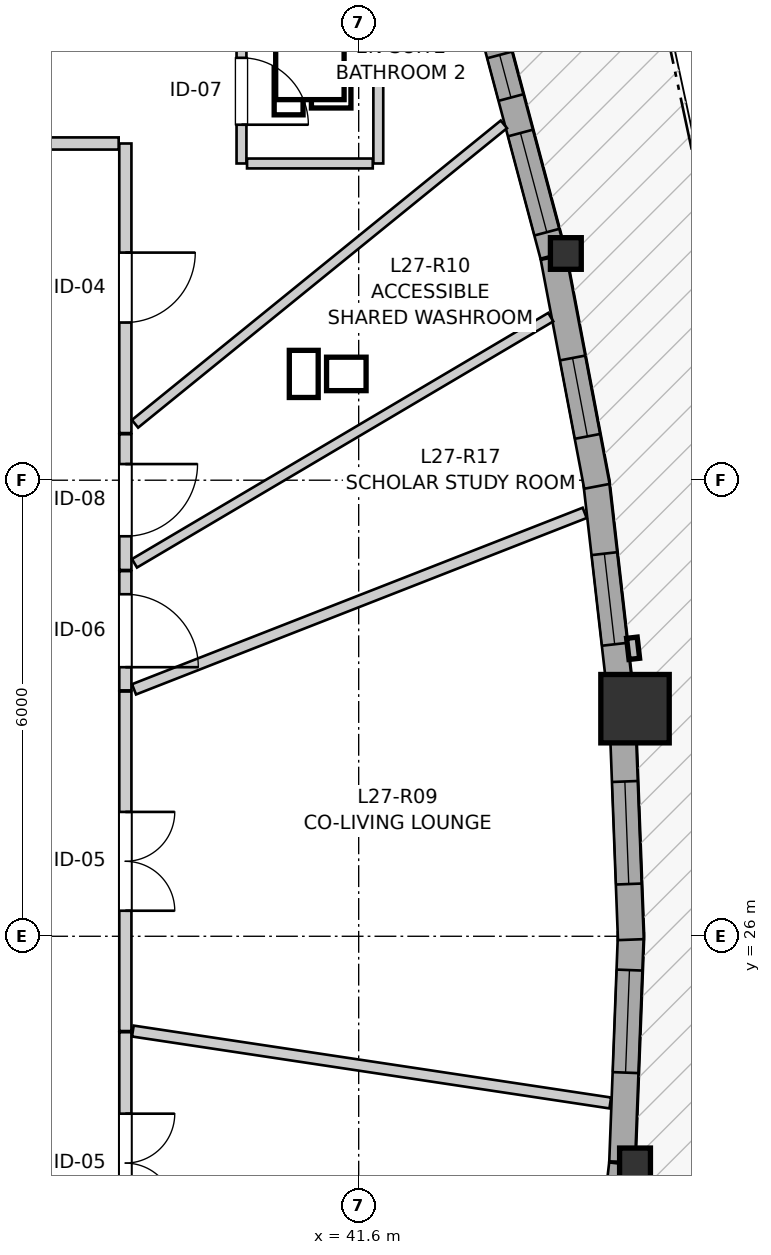
"""IFC4 building model, lengths in metres.
Left out: names, types, materials, properties, quantities, classifications, styles, units other than length and angle.
Written with IfcOpenShell. Run it as: python <this file> out.ifc"""

import sys

from ifc_helpers import new_model, si_unit, direction, frame, frame_2d, origin, origin_2d, place, context, subcontext, project, spatial, rectangle, i_section, extrude, source, transform, mapped, element, fill, save


model = new_model("IFC4")
c1 = context("Model", 3, precision=1e-05, world=origin(), true_north=direction((0.0, 1.0)))
c2 = subcontext(c1, "Body", "Model", "MODEL_VIEW")
j1 = project(units=[si_unit("LENGTHUNIT", "METRE"), si_unit("PLANEANGLEUNIT", "RADIAN")], contexts=[c1])
p1 = place(None, origin())
s1 = spatial("IfcSite", under=j1, at=p1, CompositionType="ELEMENT")
p2 = place(p1, origin())
s2 = spatial("IfcBuilding", under=s1, at=p2, CompositionType="ELEMENT")
p3 = place(p2, frame((0.0, 0.0, 92.8)))
s3 = spatial("IfcBuildingStorey", under=s2, at=p3, CompositionType="ELEMENT", Elevation=92.8)
m1 = source(origin(), c2, "Body", "SweptSolid", [
    extrude(i_section(OverallWidth=0.406, OverallDepth=0.416, WebThickness=0.027, FlangeThickness=0.044, FilletRadius=0.015, at=origin_2d()), origin(), (0.0, 0.0, 1.0), 2.95),
])
p4 = place(p3, frame((45.236, 23.006, 0.0), z_axis=(0.0, 0.0, 1.0), x_axis=(1.0, 0.0, 0.0)))
e1 = element("IfcColumn", 1, at=p4, inside=s3, PredefinedType="PILASTER", context=c2, shape_type="MappedRepresentation", body=[
    mapped(m1, transform((0.0, 0.0, 0.0), x_axis=(1.0, 0.0, 0.0), y_axis=(0.0, 1.0, 0.0), z_axis=(0.0, 0.0, 1.0), scale=1.0)),
])
m2 = source(origin(), c2, "Body", "SweptSolid", [
    extrude(rectangle(XDim=0.9, YDim=0.9, at=origin_2d()), origin(), (0.0, 0.0, 1.0), 2.95),
])
p5 = place(p3, frame((45.236, 28.994, 0.0), z_axis=(0.0, 0.0, 1.0), x_axis=(1.0, 0.0, 0.0)))
e2 = element("IfcColumn", 2, at=p5, inside=s3, PredefinedType="COLUMN", context=c2, shape_type="MappedRepresentation", body=[
    mapped(m2, transform((0.0, 0.0, 0.0), x_axis=(1.0, 0.0, 0.0), y_axis=(0.0, 1.0, 0.0), z_axis=(0.0, 0.0, 1.0), scale=1.0)),
])
p6 = place(p3, frame((44.325, 34.983, 0.0), z_axis=(0.0, 0.0, 1.0), x_axis=(1.0, 0.0, 0.0)))
e3 = element("IfcColumn", 3, at=p6, inside=s3, PredefinedType="PILASTER", context=c2, shape_type="MappedRepresentation", body=[
    mapped(m1, transform((0.0, 0.0, 0.0), x_axis=(1.0, 0.0, 0.0), y_axis=(0.0, 1.0, 0.0), z_axis=(0.0, 0.0, 1.0), scale=1.0)),
])
p7 = place(p3, frame((44.721, 19.993, 0.0), z_axis=(0.0, 0.0, 1.0), x_axis=(0.113224078967, 0.993569478165, 0.0)))
e4 = element("IfcWall", 4, at=p7, inside=s3, PredefinedType="SOLIDWALL", context=c2, shape_type="SweptSolid", body=[
    extrude(rectangle(XDim=3.032, YDim=0.34, at=frame_2d((1.516, 0.0))), origin(), (0.0, 0.0, 1.0), 2.48),
])
p8 = place(p7, frame((0.701, 0.0, 0.82)))
e5 = element("IfcOpeningElement", 5, at=p8, cuts=e4, PredefinedType="OPENING", context=c2, shape_type="SweptSolid", body=[
    extrude(rectangle(XDim=1.65, YDim=1.45, at=frame_2d((0.825, 0.725))), frame((0.0, 0.18, 0.0), z_axis=(0.0, -1.0, 0.0), x_axis=(1.0, 0.0, 0.0)), (0.0, 0.0, 1.0), 0.36),
])
p9 = place(p3, frame((45.067, 23.032, 0.0), z_axis=(0.0, 0.0, 1.0), x_axis=(0.037985210196, 0.999278301479, 0.0)))
e6 = element("IfcWall", 6, at=p9, inside=s3, PredefinedType="SOLIDWALL", context=c2, shape_type="SweptSolid", body=[
    extrude(rectangle(XDim=3.014, YDim=0.34, at=frame_2d((1.507, 0.0))), origin(), (0.0, 0.0, 1.0), 2.48),
])
p10 = place(p9, frame((1.175, 0.0, 0.82)))
e7 = element("IfcOpeningElement", 7, at=p10, cuts=e6, PredefinedType="OPENING", context=c2, shape_type="SweptSolid", body=[
    extrude(rectangle(XDim=1.35, YDim=1.45, at=frame_2d((0.675, 0.725))), frame((0.0, 0.18, 0.0), z_axis=(0.0, -1.0, 0.0), x_axis=(1.0, 0.0, 0.0)), (0.0, 0.0, 1.0), 0.36),
])
p11 = place(p3, frame((45.181, 25.956, 0.0), z_axis=(0.0, 0.0, 1.0), x_axis=(-0.037958336355, 0.999279322663, 0.0)))
e8 = element("IfcWall", 8, at=p11, inside=s3, PredefinedType="SOLIDWALL", context=c2, shape_type="SweptSolid", body=[
    extrude(rectangle(XDim=2.804, YDim=0.34, at=frame_2d((1.402, 0.0))), origin(), (0.0, 0.0, 1.0), 2.48),
])
p12 = place(p11, frame((0.732, 0.0, 0.82)))
e9 = element("IfcOpeningElement", 9, at=p12, cuts=e8, PredefinedType="OPENING", context=c2, shape_type="SweptSolid", body=[
    extrude(rectangle(XDim=1.35, YDim=1.45, at=frame_2d((0.675, 0.725))), frame((0.0, 0.18, 0.0), z_axis=(0.0, -1.0, 0.0), x_axis=(1.0, 0.0, 0.0)), (0.0, 0.0, 1.0), 0.36),
])
p13 = place(p3, frame((45.041, 29.204, 0.0), z_axis=(0.0, 0.0, 1.0), x_axis=(-0.113261075266, 0.993565261485, 0.0)))
e10 = element("IfcWall", 10, at=p13, inside=s3, PredefinedType="SOLIDWALL", context=c2, shape_type="SweptSolid", body=[
    extrude(rectangle(XDim=2.822, YDim=0.34, at=frame_2d((1.411, 0.0))), origin(), (0.0, 0.0, 1.0), 2.48),
])
p14 = place(p13, frame((0.642, 0.0, 0.82)))
e11 = element("IfcOpeningElement", 11, at=p14, cuts=e10, PredefinedType="OPENING", context=c2, shape_type="SweptSolid", body=[
    extrude(rectangle(XDim=1.2, YDim=1.45, at=frame_2d((0.6, 0.725))), frame((0.0, 0.18, 0.0), z_axis=(0.0, -1.0, 0.0), x_axis=(1.0, 0.0, 0.0)), (0.0, 0.0, 1.0), 0.36),
])
p15 = place(p3, frame((44.735, 31.919, 0.0), z_axis=(0.0, 0.0, 1.0), x_axis=(-0.186735196273, 0.982410284185, 0.0)))
e12 = element("IfcWall", 12, at=p15, inside=s3, PredefinedType="SOLIDWALL", context=c2, shape_type="SweptSolid", body=[
    extrude(rectangle(XDim=3.066, YDim=0.34, at=frame_2d((1.533, 0.0))), origin(), (0.0, 0.0, 1.0), 2.48),
])
p16 = place(p15, frame((0.669, 0.0, 0.82)))
e13 = element("IfcOpeningElement", 13, at=p16, cuts=e12, PredefinedType="OPENING", context=c2, shape_type="SweptSolid", body=[
    extrude(rectangle(XDim=1.05, YDim=1.45, at=frame_2d((0.525, 0.725))), frame((0.0, 0.18, 0.0), z_axis=(0.0, -1.0, 0.0), x_axis=(1.0, 0.0, 0.0)), (0.0, 0.0, 1.0), 0.36),
])
p17 = place(p3, frame((44.156, 34.958, 0.0), z_axis=(0.0, 0.0, 1.0), x_axis=(-0.257033600382, 0.966402467026, 0.0)))
e14 = element("IfcWall", 14, at=p17, inside=s3, PredefinedType="SOLIDWALL", context=c2, shape_type="SweptSolid", body=[
    extrude(rectangle(XDim=3.116, YDim=0.34, at=frame_2d((1.558, 0.0))), origin(), (0.0, 0.0, 1.0), 2.48),
])
p18 = place(p17, frame((0.315, 0.0, 0.82)))
e15 = element("IfcOpeningElement", 15, at=p18, cuts=e14, PredefinedType="OPENING", context=c2, shape_type="SweptSolid", body=[
    extrude(rectangle(XDim=1.35, YDim=1.45, at=frame_2d((0.675, 0.725))), frame((0.0, 0.18, 0.0), z_axis=(0.0, -1.0, 0.0), x_axis=(1.0, 0.0, 0.0)), (0.0, 0.0, 1.0), 0.36),
])
p19 = place(p17, frame((2.148, 0.0, 0.82)))
e16 = element("IfcOpeningElement", 16, at=p19, cuts=e14, PredefinedType="OPENING", context=c2, shape_type="SweptSolid", body=[
    extrude(rectangle(XDim=0.58, YDim=1.35, at=frame_2d((0.29, 0.675))), frame((0.0, 0.18, 0.0), z_axis=(0.0, -1.0, 0.0), x_axis=(1.0, 0.0, 0.0)), (0.0, 0.0, 1.0), 0.36),
])
p20 = place(p3, frame((38.53, 29.22, 0.0), z_axis=(0.0, 0.0, 1.0), x_axis=(0.0, -1.0, 0.0)))
e17 = element("IfcWall", 17, at=p20, inside=s3, PredefinedType="PARTITIONING", context=c2, shape_type="SweptSolid", body=[
    extrude(rectangle(XDim=4.467, YDim=0.16, at=frame_2d((2.233, 0.0))), origin(), (0.0, 0.0, 1.0), 2.95),
])
p21 = place(p20, frame((1.584, 0.0, 0.0)))
e18 = element("IfcOpeningElement", 18, at=p21, cuts=e17, PredefinedType="OPENING", context=c2, shape_type="SweptSolid", body=[
    extrude(rectangle(XDim=1.3, YDim=2.1, at=frame_2d((0.65, 1.05))), frame((0.0, 0.09, 0.0), z_axis=(0.0, -1.0, 0.0), x_axis=(1.0, 0.0, 0.0)), (0.0, 0.0, 1.0), 0.18),
])
p22 = place(p3, frame((38.53, 36.43, 0.0), z_axis=(0.0, 0.0, 1.0), x_axis=(0.0, -1.0, 0.0)))
e19 = element("IfcWall", 19, at=p22, inside=s3, PredefinedType="PARTITIONING", context=c2, shape_type="SweptSolid", body=[
    extrude(rectangle(XDim=3.81, YDim=0.16, at=frame_2d((1.905, 0.0))), origin(), (0.0, 0.0, 1.0), 2.588),
])
p23 = place(p22, frame((1.436, 0.0, 0.0)))
e20 = element("IfcOpeningElement", 20, at=p23, cuts=e19, PredefinedType="OPENING", context=c2, shape_type="SweptSolid", body=[
    extrude(rectangle(XDim=0.92, YDim=2.1, at=frame_2d((0.46, 1.05))), frame((0.0, 0.09, 0.0), z_axis=(0.0, -1.0, 0.0), x_axis=(1.0, 0.0, 0.0)), (0.0, 0.0, 1.0), 0.18),
])
p24 = place(p3, frame((38.53, 24.738, 0.0), z_axis=(0.0, 0.0, 1.0), x_axis=(0.0, -1.0, 0.0)))
e21 = element("IfcWall", 21, at=p24, inside=s3, PredefinedType="PARTITIONING", context=c2, shape_type="SweptSolid", body=[
    extrude(rectangle(XDim=3.442, YDim=0.16, at=frame_2d((1.721, 0.0))), origin(), (0.0, 0.0, 1.0), 2.95),
])
p25 = place(p24, frame((1.072, 0.0, 0.0)))
e22 = element("IfcOpeningElement", 22, at=p25, cuts=e21, PredefinedType="OPENING", context=c2, shape_type="SweptSolid", body=[
    extrude(rectangle(XDim=1.3, YDim=2.1, at=frame_2d((0.65, 1.05))), frame((0.0, 0.09, 0.0), z_axis=(0.0, -1.0, 0.0), x_axis=(1.0, 0.0, 0.0)), (0.0, 0.0, 1.0), 0.18),
])
p26 = place(p3, frame((40.058, 38.067, 0.0), z_axis=(0.0, 0.0, 1.0), x_axis=(0.0, -1.0, 0.0)))
e23 = element("IfcWall", 23, at=p26, inside=s3, PredefinedType="PARTITIONING", context=c2, shape_type="SweptSolid", body=[
    extrude(rectangle(XDim=1.9, YDim=0.13, at=frame_2d((0.95, 0.0))), origin(), (0.0, 0.0, 1.0), 2.95),
])
p27 = place(p26, frame((0.51, 0.0, 0.0)))
e24 = element("IfcOpeningElement", 24, at=p27, cuts=e23, PredefinedType="OPENING", context=c2, shape_type="SweptSolid", body=[
    extrude(rectangle(XDim=0.88, YDim=2.05, at=frame_2d((0.44, 1.025))), frame((0.0, 0.075, 0.0), z_axis=(0.0, -1.0, 0.0), x_axis=(1.0, 0.0, 0.0)), (0.0, 0.0, 1.0), 0.15),
])
p28 = place(p3, frame((38.53, 32.605, 0.0), z_axis=(0.0, 0.0, 1.0), x_axis=(0.0, -1.0, 0.0)))
e25 = element("IfcWall", 25, at=p28, inside=s3, PredefinedType="PARTITIONING", context=c2, shape_type="SweptSolid", body=[
    extrude(rectangle(XDim=1.786, YDim=0.16, at=frame_2d((0.893, 0.0))), origin(), (0.0, 0.0, 1.0), 2.95),
])
p29 = place(p28, frame((0.393, 0.0, 0.0)))
e26 = element("IfcOpeningElement", 26, at=p29, cuts=e25, PredefinedType="OPENING", context=c2, shape_type="SweptSolid", body=[
    extrude(rectangle(XDim=0.95, YDim=2.1, at=frame_2d((0.475, 1.05))), frame((0.0, 0.09, 0.0), z_axis=(0.0, -1.0, 0.0), x_axis=(1.0, 0.0, 0.0)), (0.0, 0.0, 1.0), 0.18),
])
p30 = place(p3, frame((38.53, 30.804, 0.0), z_axis=(0.0, 0.0, 1.0), x_axis=(0.0, -1.0, 0.0)))
e27 = element("IfcWall", 27, at=p30, inside=s3, PredefinedType="PARTITIONING", context=c2, shape_type="SweptSolid", body=[
    extrude(rectangle(XDim=1.569, YDim=0.16, at=frame_2d((0.784, 0.0))), origin(), (0.0, 0.0, 1.0), 2.95),
])
p31 = place(p30, frame((0.304, 0.0, 0.0)))
e28 = element("IfcOpeningElement", 28, at=p31, cuts=e27, PredefinedType="OPENING", context=c2, shape_type="SweptSolid", body=[
    extrude(rectangle(XDim=0.96, YDim=2.1, at=frame_2d((0.48, 1.05))), frame((0.0, 0.09, 0.0), z_axis=(0.0, -1.0, 0.0), x_axis=(1.0, 0.0, 0.0)), (0.0, 0.0, 1.0), 0.18),
])
p32 = place(p3, frame((36.475, 36.553, 0.0), z_axis=(0.0, 0.0, 1.0), x_axis=(0.501895508122, 0.864928262301, 0.0)))
e29 = element("IfcWall", 29, at=p32, inside=s3, PredefinedType="PARTITIONING", context=c2, shape_type="SweptSolid", body=[
    extrude(rectangle(XDim=8.958, YDim=0.145, at=frame_2d((4.479, 0.0))), origin(), (0.0, 0.0, 1.0), 2.95),
])
p33 = place(p3, frame((38.644, 29.249, 0.0), z_axis=(0.0, 0.0, 1.0), x_axis=(0.931159602012, 0.364611842349, 0.0)))
e30 = element("IfcWall", 30, at=p33, inside=s3, PredefinedType="PARTITIONING", context=c2, shape_type="SweptSolid", body=[
    extrude(rectangle(XDim=6.368, YDim=0.145, at=frame_2d((3.184, 0.0))), origin(), (0.0, 0.0, 1.0), 2.95),
])
p34 = place(p3, frame((38.65, 30.907, 0.0), z_axis=(0.0, 0.0, 1.0), x_axis=(0.860799697267, 0.508943888052, 0.0)))
e31 = element("IfcWall", 31, at=p34, inside=s3, PredefinedType="PARTITIONING", context=c2, shape_type="SweptSolid", body=[
    extrude(rectangle(XDim=6.363, YDim=0.13, at=frame_2d((3.181, 0.0))), origin(), (0.0, 0.0, 1.0), 2.95),
])
p35 = place(p3, frame((38.629, 24.753, 0.0), z_axis=(0.0, 0.0, 1.0), x_axis=(0.988841427723, -0.148971912852, 0.0)))
e32 = element("IfcWall", 32, at=p35, inside=s3, PredefinedType="PARTITIONING", context=c2, shape_type="SweptSolid", body=[
    extrude(rectangle(XDim=6.352, YDim=0.145, at=frame_2d((3.176, 0.0))), origin(), (0.0, 0.0, 1.0), 2.95),
])
p36 = place(p3, frame((38.657, 32.742, 0.0), z_axis=(0.0, 0.0, 1.0), x_axis=(0.776413778101, 0.630223488276, 0.0)))
e33 = element("IfcWall", 33, at=p36, inside=s3, PredefinedType="PARTITIONING", context=c2, shape_type="SweptSolid", body=[
    extrude(rectangle(XDim=6.251, YDim=0.13, at=frame_2d((3.125, 0.0))), origin(), (0.0, 0.0, 1.0), 2.95),
])
p37 = place(p3, frame((36.573, 36.43, 0.0), z_axis=(0.0, 0.0, 1.0), x_axis=(1.0, 0.0, 0.0)))
e34 = element("IfcWall", 34, at=p37, inside=s3, PredefinedType="PARTITIONING", context=c2, shape_type="SweptSolid", body=[
    extrude(rectangle(XDim=1.869, YDim=0.16, at=frame_2d((0.934, 0.0))), origin(), (0.0, 0.0, 1.0), 2.588),
])
p38 = place(p3, frame((41.858, 36.167, 0.0), z_axis=(0.0, 0.0, 1.0), x_axis=(0.0, 1.0, 0.0)))
e35 = element("IfcWall", 35, at=p38, inside=s3, PredefinedType="PARTITIONING", context=c2, shape_type="SweptSolid", body=[
    extrude(rectangle(XDim=1.9, YDim=0.13, at=frame_2d((0.95, 0.0))), origin(), (0.0, 0.0, 1.0), 2.95),
])
p39 = place(p3, frame((40.131, 36.167, 0.0), z_axis=(0.0, 0.0, 1.0), x_axis=(1.0, 0.0, 0.0)))
e36 = element("IfcWall", 36, at=p39, inside=s3, PredefinedType="PARTITIONING", context=c2, shape_type="SweptSolid", body=[
    extrude(rectangle(XDim=1.654, YDim=0.13, at=frame_2d((0.827, 0.0))), origin(), (0.0, 0.0, 1.0), 2.95),
])
m3 = source(origin(), c2, "Body", "SweptSolid", [
    extrude(rectangle(XDim=1.35, YDim=1.45, at=frame_2d((0.675, 0.725))), frame((0.0, 0.03, 0.0), z_axis=(0.0, -1.0, 0.0), x_axis=(1.0, 0.0, 0.0)), (0.0, 0.0, 1.0), 0.06),
])
p40 = place(p10, origin())
e37 = element("IfcWindow", 37, at=p40, inside=s3, PartitioningType="SINGLE_PANEL", PredefinedType="WINDOW", context=c2, shape_type="MappedRepresentation", body=[
    mapped(m3, transform((0.0, 0.0, 0.0), x_axis=(1.0, 0.0, 0.0), y_axis=(0.0, 1.0, 0.0), z_axis=(0.0, 0.0, 1.0), scale=1.0)),
])
fill(e7, e37)
p41 = place(p12, origin())
e38 = element("IfcWindow", 38, at=p41, inside=s3, PartitioningType="SINGLE_PANEL", PredefinedType="WINDOW", context=c2, shape_type="MappedRepresentation", body=[
    mapped(m3, transform((0.0, 0.0, 0.0), x_axis=(1.0, 0.0, 0.0), y_axis=(0.0, 1.0, 0.0), z_axis=(0.0, 0.0, 1.0), scale=1.0)),
])
fill(e9, e38)
m4 = source(origin(), c2, "Body", "SweptSolid", [
    extrude(rectangle(XDim=1.2, YDim=1.45, at=frame_2d((0.6, 0.725))), frame((0.0, 0.03, 0.0), z_axis=(0.0, -1.0, 0.0), x_axis=(1.0, 0.0, 0.0)), (0.0, 0.0, 1.0), 0.06),
])
p42 = place(p14, origin())
e39 = element("IfcWindow", 39, at=p42, inside=s3, PartitioningType="SINGLE_PANEL", PredefinedType="WINDOW", context=c2, shape_type="MappedRepresentation", body=[
    mapped(m4, transform((0.0, 0.0, 0.0), x_axis=(1.0, 0.0, 0.0), y_axis=(0.0, 1.0, 0.0), z_axis=(0.0, 0.0, 1.0), scale=1.0)),
])
fill(e11, e39)
m5 = source(origin(), c2, "Body", "SweptSolid", [
    extrude(rectangle(XDim=1.05, YDim=1.45, at=frame_2d((0.525, 0.725))), frame((0.0, 0.03, 0.0), z_axis=(0.0, -1.0, 0.0), x_axis=(1.0, 0.0, 0.0)), (0.0, 0.0, 1.0), 0.06),
])
p43 = place(p16, origin())
e40 = element("IfcWindow", 40, at=p43, inside=s3, PartitioningType="SINGLE_PANEL", PredefinedType="WINDOW", context=c2, shape_type="MappedRepresentation", body=[
    mapped(m5, transform((0.0, 0.0, 0.0), x_axis=(1.0, 0.0, 0.0), y_axis=(0.0, 1.0, 0.0), z_axis=(0.0, 0.0, 1.0), scale=1.0)),
])
fill(e13, e40)
p44 = place(p18, origin())
e41 = element("IfcWindow", 41, at=p44, inside=s3, PartitioningType="SINGLE_PANEL", PredefinedType="WINDOW", context=c2, shape_type="MappedRepresentation", body=[
    mapped(m3, transform((0.0, 0.0, 0.0), x_axis=(1.0, 0.0, 0.0), y_axis=(0.0, 1.0, 0.0), z_axis=(0.0, 0.0, 1.0), scale=1.0)),
])
fill(e15, e41)
m6 = source(origin(), c2, "Body", "SweptSolid", [
    extrude(rectangle(XDim=0.58, YDim=1.35, at=frame_2d((0.29, 0.675))), frame((0.0, 0.03, 0.0), z_axis=(0.0, -1.0, 0.0), x_axis=(1.0, 0.0, 0.0)), (0.0, 0.0, 1.0), 0.06),
])
p45 = place(p19, origin())
e42 = element("IfcWindow", 42, at=p45, inside=s3, PartitioningType="SINGLE_PANEL", PredefinedType="WINDOW", context=c2, shape_type="MappedRepresentation", body=[
    mapped(m6, transform((0.0, 0.0, 0.0), x_axis=(1.0, 0.0, 0.0), y_axis=(0.0, 1.0, 0.0), z_axis=(0.0, 0.0, 1.0), scale=1.0)),
])
fill(e16, e42)
m7 = source(origin(), c2, "Body", "SweptSolid", [
    extrude(rectangle(XDim=1.3, YDim=2.1, at=frame_2d((0.65, 1.05))), frame((0.0, 0.025, 0.0), z_axis=(0.0, -1.0, 0.0), x_axis=(1.0, 0.0, 0.0)), (0.0, 0.0, 1.0), 0.05),
])
p46 = place(p21, origin())
e43 = element("IfcDoor", 43, at=p46, inside=s3, OperationType="DOUBLE_DOOR_SINGLE_SWING", PredefinedType="DOOR", context=c2, shape_type="MappedRepresentation", body=[
    mapped(m7, transform((0.0, 0.0, 0.0), x_axis=(1.0, 0.0, 0.0), y_axis=(0.0, 1.0, 0.0), z_axis=(0.0, 0.0, 1.0), scale=1.0)),
])
fill(e18, e43)
m8 = source(origin(), c2, "Body", "SweptSolid", [
    extrude(rectangle(XDim=0.92, YDim=2.1, at=frame_2d((0.46, 1.05))), frame((0.0, 0.025, 0.0), z_axis=(0.0, -1.0, 0.0), x_axis=(1.0, 0.0, 0.0)), (0.0, 0.0, 1.0), 0.05),
])
p47 = place(p23, origin())
e44 = element("IfcDoor", 44, at=p47, inside=s3, OperationType="SINGLE_SWING_LEFT", PredefinedType="DOOR", context=c2, shape_type="MappedRepresentation", body=[
    mapped(m8, transform((0.0, 0.0, 0.0), x_axis=(1.0, 0.0, 0.0), y_axis=(0.0, 1.0, 0.0), z_axis=(0.0, 0.0, 1.0), scale=1.0)),
])
fill(e20, e44)
p48 = place(p25, origin())
e45 = element("IfcDoor", 45, at=p48, inside=s3, OperationType="DOUBLE_DOOR_SINGLE_SWING", PredefinedType="DOOR", context=c2, shape_type="MappedRepresentation", body=[
    mapped(m7, transform((0.0, 0.0, 0.0), x_axis=(1.0, 0.0, 0.0), y_axis=(0.0, 1.0, 0.0), z_axis=(0.0, 0.0, 1.0), scale=1.0)),
])
fill(e22, e45)
m9 = source(origin(), c2, "Body", "SweptSolid", [
    extrude(rectangle(XDim=0.88, YDim=2.05, at=frame_2d((0.44, 1.025))), frame((0.0, 0.025, 0.0), z_axis=(0.0, -1.0, 0.0), x_axis=(1.0, 0.0, 0.0)), (0.0, 0.0, 1.0), 0.05),
])
p49 = place(p27, origin())
e46 = element("IfcDoor", 46, at=p49, inside=s3, OperationType="SINGLE_SWING_RIGHT", PredefinedType="DOOR", context=c2, shape_type="MappedRepresentation", body=[
    mapped(m9, transform((0.0, 0.0, 0.0), x_axis=(1.0, 0.0, 0.0), y_axis=(0.0, 1.0, 0.0), z_axis=(0.0, 0.0, 1.0), scale=1.0)),
])
fill(e24, e46)
m10 = source(origin(), c2, "Body", "SweptSolid", [
    extrude(rectangle(XDim=0.95, YDim=2.1, at=frame_2d((0.475, 1.05))), frame((0.0, 0.025, 0.0), z_axis=(0.0, -1.0, 0.0), x_axis=(1.0, 0.0, 0.0)), (0.0, 0.0, 1.0), 0.05),
])
p50 = place(p29, origin())
e47 = element("IfcDoor", 47, at=p50, inside=s3, OperationType="SINGLE_SWING_LEFT", PredefinedType="DOOR", context=c2, shape_type="MappedRepresentation", body=[
    mapped(m10, transform((0.0, 0.0, 0.0), x_axis=(1.0, 0.0, 0.0), y_axis=(0.0, 1.0, 0.0), z_axis=(0.0, 0.0, 1.0), scale=1.0)),
])
fill(e26, e47)
m11 = source(origin(), c2, "Body", "SweptSolid", [
    extrude(rectangle(XDim=0.96, YDim=2.1, at=frame_2d((0.48, 1.05))), frame((0.0, 0.025, 0.0), z_axis=(0.0, -1.0, 0.0), x_axis=(1.0, 0.0, 0.0)), (0.0, 0.0, 1.0), 0.05),
])
p51 = place(p31, origin())
e48 = element("IfcDoor", 48, at=p51, inside=s3, OperationType="SINGLE_SWING_RIGHT", PredefinedType="DOOR", context=c2, shape_type="MappedRepresentation", body=[
    mapped(m11, transform((0.0, 0.0, 0.0), x_axis=(1.0, 0.0, 0.0), y_axis=(0.0, 1.0, 0.0), z_axis=(0.0, 0.0, 1.0), scale=1.0)),
])
fill(e28, e48)
save(model, sys.argv[1])
